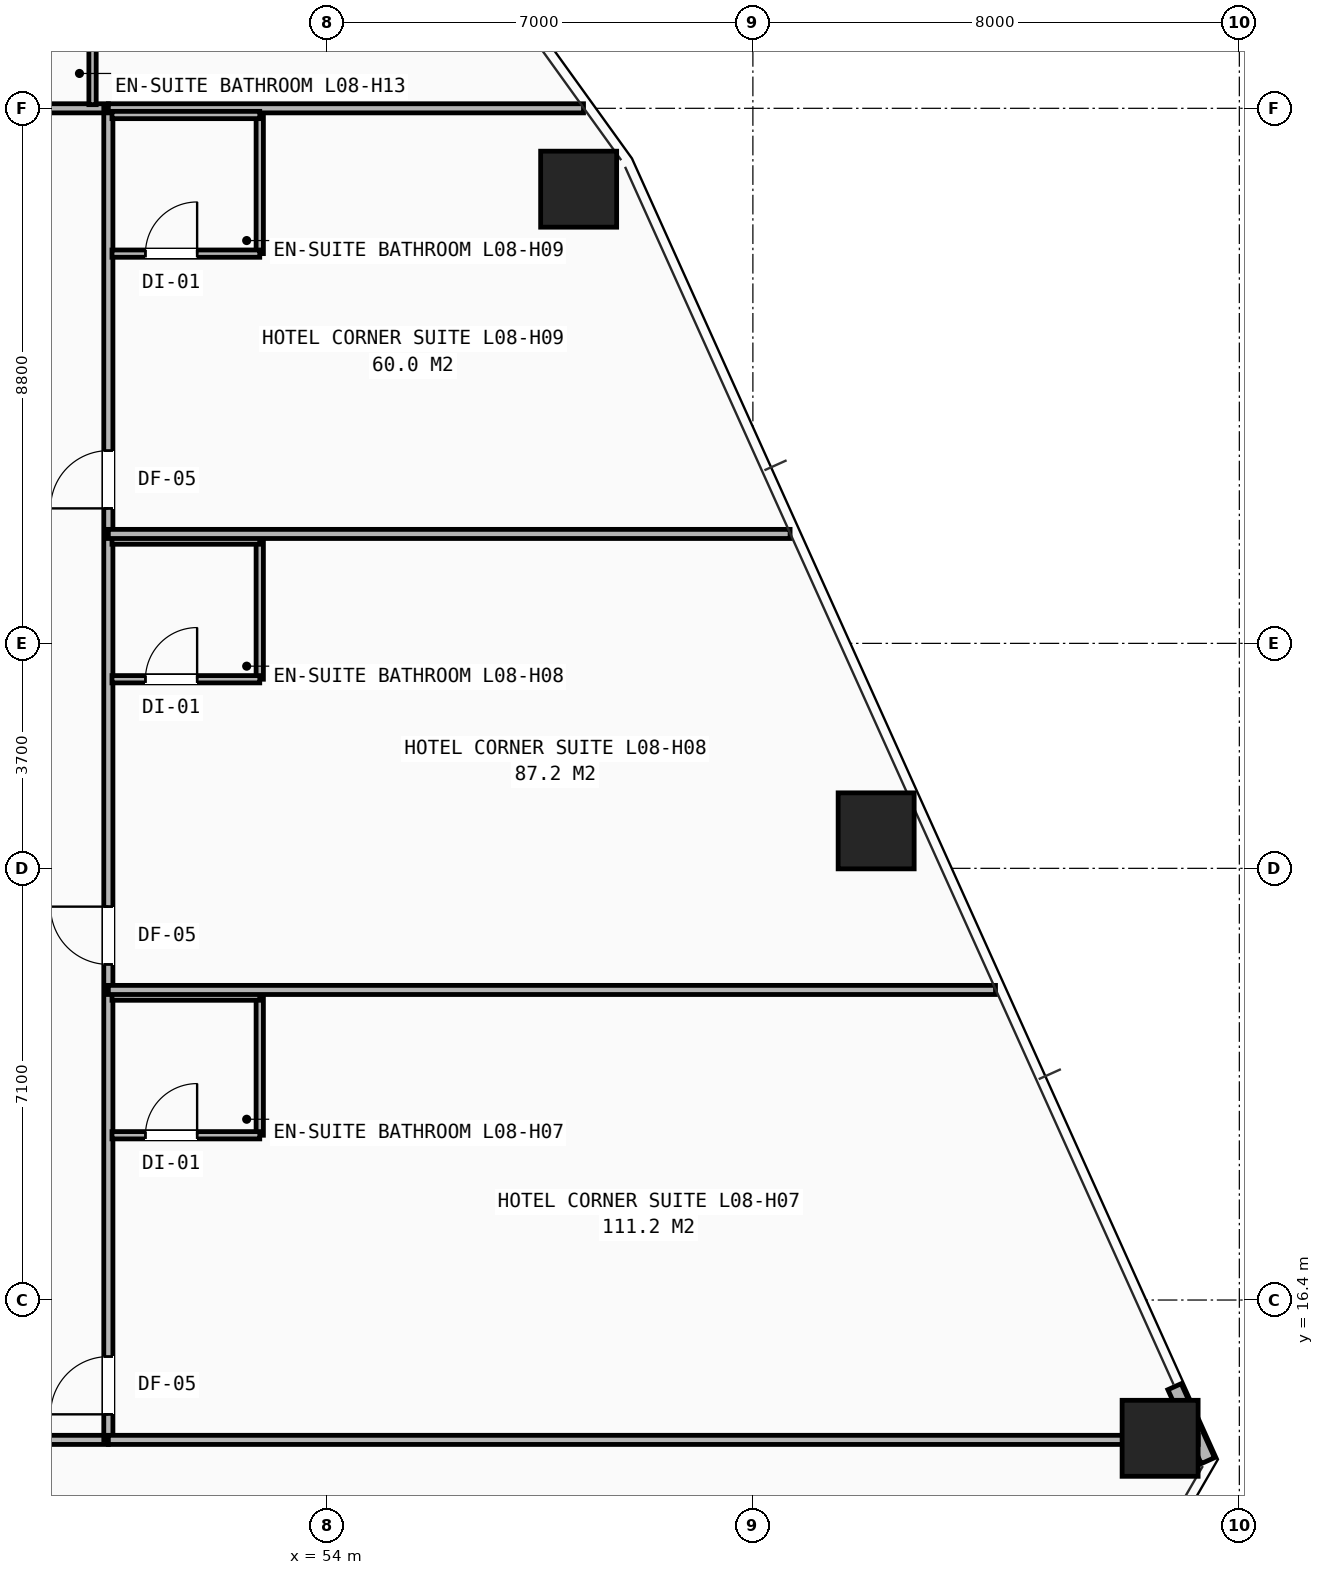
"""IFC4 building model, lengths in metres.
Left out: names, types, materials, properties, quantities, classifications, styles, units other than length and angle.
Written with IfcOpenShell. Run it as: python <this file> out.ifc"""

import sys

from ifc_helpers import new_model, si_unit, direction, frame, frame_2d, origin, origin_2d, place, context, subcontext, project, spatial, rectangle, hollow_rectangle, extrude, element, fill, save


model = new_model("IFC4")
c1 = context("Model", 3, precision=1e-05, world=origin(), true_north=direction((0.0, 1.0)))
c2 = subcontext(c1, "Body", "Model", "MODEL_VIEW")
j1 = project(units=[si_unit("LENGTHUNIT", "METRE"), si_unit("PLANEANGLEUNIT", "RADIAN")], contexts=[c1])
p1 = place(None, origin())
s1 = spatial("IfcSite", under=j1, at=p1, CompositionType="ELEMENT")
p2 = place(p1, origin())
s2 = spatial("IfcBuilding", under=s1, at=p2, CompositionType="ELEMENT")
p3 = place(p2, frame((0.0, 0.0, 33.6)))
s3 = spatial("IfcBuildingStorey", under=s2, at=p3, CompositionType="ELEMENT", Elevation=33.6)
for number, where, z_axis, x_axis in (
    (1, (67.697, 14.126, 0.0), (0.0, 0.0, 1.0), (1.0, 0.0, 0.0)),
    (2, (63.027, 24.116, 0.0), (0.0, 0.0, 1.0), (1.0, 0.0, 0.0)),
    (3, (58.135, 34.67, 0.0), (0.0, 0.0, 1.0), (1.0, 0.0, 0.0)),
):
    element("IfcColumn", number, at=place(p3, frame(where, z_axis=z_axis, x_axis=x_axis)), inside=s3, PredefinedType="COLUMN", context=c2, shape_type="SweptSolid", body=[
        extrude(hollow_rectangle(XDim=1.25, YDim=1.25, WallThickness=0.08, at=origin_2d()), origin(), (0.0, 0.0, 1.0), 3.2),
    ])
p4 = place(p3, frame((68.483, 13.758, 0.0), z_axis=(0.0, 0.0, 1.0), x_axis=(-0.410767856127, 0.91173996752, 0.0)))
e4 = element("IfcWall", 4, at=p4, inside=s3, PredefinedType="SHEAR", context=c2, shape_type="SweptSolid", body=[
    extrude(rectangle(XDim=1.334, YDim=0.24, at=frame_2d((0.667, 0.0))), origin(), (0.0, 0.0, 1.0), 2.263),
])
p5 = place(p3, frame((29.6, 14.1, 0.0), z_axis=(0.0, 0.0, 1.0), x_axis=(1.0, 0.0, 0.0)))
e5 = element("IfcWall", 5, at=p5, inside=s3, PredefinedType="PARTITIONING", context=c2, shape_type="SweptSolid", body=[
    extrude(rectangle(XDim=20.8, YDim=0.15, at=frame_2d((10.4, 0.0))), origin(), (0.0, 0.0, 1.0), 2.191),
])
p6 = place(p5, frame((0.57, 0.0, 0.0)))
e6 = element("IfcOpeningElement", 6, at=p6, cuts=e5, PredefinedType="OPENING", context=c2, shape_type="SweptSolid", body=[
    extrude(rectangle(XDim=0.95, YDim=2.1, at=frame_2d((0.475, 1.05))), frame((0.0, 0.085, 0.0), z_axis=(0.0, -1.0, 0.0), x_axis=(1.0, 0.0, 0.0)), (0.0, 0.0, 1.0), 0.17),
])
p7 = place(p5, frame((5.32, 0.0, 0.0)))
e7 = element("IfcOpeningElement", 7, at=p7, cuts=e5, PredefinedType="OPENING", context=c2, shape_type="SweptSolid", body=[
    extrude(rectangle(XDim=0.95, YDim=2.1, at=frame_2d((0.475, 1.05))), frame((0.0, 0.085, 0.0), z_axis=(0.0, -1.0, 0.0), x_axis=(1.0, 0.0, 0.0)), (0.0, 0.0, 1.0), 0.17),
])
p8 = place(p5, frame((13.32, 0.0, 0.0)))
e8 = element("IfcOpeningElement", 8, at=p8, cuts=e5, PredefinedType="OPENING", context=c2, shape_type="SweptSolid", body=[
    extrude(rectangle(XDim=0.95, YDim=2.1, at=frame_2d((0.475, 1.05))), frame((0.0, 0.085, 0.0), z_axis=(0.0, -1.0, 0.0), x_axis=(1.0, 0.0, 0.0)), (0.0, 0.0, 1.0), 0.17),
])
p9 = place(p3, frame((41.475, 36.0, 0.0), z_axis=(0.0, 0.0, 1.0), x_axis=(1.0, 0.0, 0.0)))
e9 = element("IfcWall", 9, at=p9, inside=s3, PredefinedType="PARTITIONING", context=c2, shape_type="SweptSolid", body=[
    extrude(rectangle(XDim=8.925, YDim=0.15, at=frame_2d((4.462, 0.0))), origin(), (0.0, 0.0, 1.0), 2.513),
])
p10 = place(p9, frame((0.2, 0.0, 0.0)))
e10 = element("IfcOpeningElement", 10, at=p10, cuts=e9, PredefinedType="OPENING", context=c2, shape_type="SweptSolid", body=[
    extrude(rectangle(XDim=0.95, YDim=2.1, at=frame_2d((0.475, 1.05))), frame((0.0, 0.085, 0.0), z_axis=(0.0, -1.0, 0.0), x_axis=(1.0, 0.0, 0.0)), (0.0, 0.0, 1.0), 0.17),
])
p11 = place(p9, frame((4.445, 0.0, 0.0)))
e11 = element("IfcOpeningElement", 11, at=p11, cuts=e9, PredefinedType="OPENING", context=c2, shape_type="SweptSolid", body=[
    extrude(rectangle(XDim=0.95, YDim=2.1, at=frame_2d((0.475, 1.05))), frame((0.0, 0.085, 0.0), z_axis=(0.0, -1.0, 0.0), x_axis=(1.0, 0.0, 0.0)), (0.0, 0.0, 1.0), 0.17),
])
p12 = place(p3, frame((50.4, 14.1, 0.0), z_axis=(0.0, 0.0, 1.0), x_axis=(0.0, 1.0, 0.0)))
e12 = element("IfcWall", 12, at=p12, inside=s3, PredefinedType="PARTITIONING", context=c2, shape_type="SweptSolid", body=[
    extrude(rectangle(XDim=21.9, YDim=0.15, at=frame_2d((10.95, 0.0))), origin(), (0.0, 0.0, 1.0), 2.191),
])
p13 = place(p12, frame((0.42, 0.0, 0.0)))
e13 = element("IfcOpeningElement", 13, at=p13, cuts=e12, PredefinedType="OPENING", context=c2, shape_type="SweptSolid", body=[
    extrude(rectangle(XDim=0.95, YDim=2.1, at=frame_2d((0.475, 1.05))), frame((0.0, 0.085, 0.0), z_axis=(0.0, -1.0, 0.0), x_axis=(1.0, 0.0, 0.0)), (0.0, 0.0, 1.0), 0.17),
])
p14 = place(p12, frame((7.82, 0.0, 0.0)))
e14 = element("IfcOpeningElement", 14, at=p14, cuts=e12, PredefinedType="OPENING", context=c2, shape_type="SweptSolid", body=[
    extrude(rectangle(XDim=0.95, YDim=2.1, at=frame_2d((0.475, 1.05))), frame((0.0, 0.085, 0.0), z_axis=(0.0, -1.0, 0.0), x_axis=(1.0, 0.0, 0.0)), (0.0, 0.0, 1.0), 0.17),
])
p15 = place(p12, frame((15.32, 0.0, 0.0)))
e15 = element("IfcOpeningElement", 15, at=p15, cuts=e12, PredefinedType="OPENING", context=c2, shape_type="SweptSolid", body=[
    extrude(rectangle(XDim=0.95, YDim=2.1, at=frame_2d((0.475, 1.05))), frame((0.0, 0.085, 0.0), z_axis=(0.0, -1.0, 0.0), x_axis=(1.0, 0.0, 0.0)), (0.0, 0.0, 1.0), 0.17),
])
p16 = place(p3, frame((50.4, 14.1, 0.0), z_axis=(0.0, 0.0, 1.0), x_axis=(1.0, 0.0, 0.0)))
e16 = element("IfcWall", 16, at=p16, inside=s3, PredefinedType="PARTITIONING", context=c2, shape_type="SweptSolid", body=[
    extrude(rectangle(XDim=17.923, YDim=0.15, at=frame_2d((8.961, 0.0))), origin(), (0.0, 0.0, 1.0), 2.191),
])
p17 = place(p3, frame((50.4, 36.0, 0.0), z_axis=(0.0, 0.0, 1.0), x_axis=(1.0, 0.0, 0.0)))
e17 = element("IfcWall", 17, at=p17, inside=s3, PredefinedType="PARTITIONING", context=c2, shape_type="SweptSolid", body=[
    extrude(rectangle(XDim=7.814, YDim=0.15, at=frame_2d((3.907, 0.0))), origin(), (0.0, 0.0, 1.0), 2.268),
])
p18 = place(p3, frame((52.89, 19.11, 0.0), z_axis=(0.0, 0.0, 1.0), x_axis=(0.0, 1.0, 0.0)))
e18 = element("IfcWall", 18, at=p18, inside=s3, PredefinedType="PARTITIONING", context=c2, shape_type="SweptSolid", body=[
    extrude(rectangle(XDim=2.28, YDim=0.12, at=frame_2d((1.14, 0.0))), origin(), (0.0, 0.0, 1.0), 2.98),
])
p19 = place(p3, frame((50.46, 19.11, 0.0), z_axis=(0.0, 0.0, 1.0), x_axis=(1.0, 0.0, 0.0)))
e19 = element("IfcWall", 19, at=p19, inside=s3, PredefinedType="PARTITIONING", context=c2, shape_type="SweptSolid", body=[
    extrude(rectangle(XDim=2.43, YDim=0.12, at=frame_2d((1.215, 0.0))), origin(), (0.0, 0.0, 1.0), 2.98),
])
p20 = place(p19, frame((0.55, 0.0, 0.0)))
e20 = element("IfcOpeningElement", 20, at=p20, cuts=e19, PredefinedType="OPENING", context=c2, shape_type="SweptSolid", body=[
    extrude(rectangle(XDim=0.85, YDim=2.05, at=frame_2d((0.425, 1.025))), frame((0.0, 0.07, 0.0), z_axis=(0.0, -1.0, 0.0), x_axis=(1.0, 0.0, 0.0)), (0.0, 0.0, 1.0), 0.14),
])
p21 = place(p3, frame((50.46, 21.39, 0.0), z_axis=(0.0, 0.0, 1.0), x_axis=(1.0, 0.0, 0.0)))
e21 = element("IfcWall", 21, at=p21, inside=s3, PredefinedType="PARTITIONING", context=c2, shape_type="SweptSolid", body=[
    extrude(rectangle(XDim=2.43, YDim=0.12, at=frame_2d((1.215, 0.0))), origin(), (0.0, 0.0, 1.0), 2.98),
])
p22 = place(p3, frame((50.4, 21.5, 0.0), z_axis=(0.0, 0.0, 1.0), x_axis=(1.0, 0.0, 0.0)))
e22 = element("IfcWall", 22, at=p22, inside=s3, PredefinedType="PARTITIONING", context=c2, shape_type="SweptSolid", body=[
    extrude(rectangle(XDim=14.59, YDim=0.15, at=frame_2d((7.295, 0.0))), origin(), (0.0, 0.0, 1.0), 2.268),
])
p23 = place(p3, frame((52.89, 26.61, 0.0), z_axis=(0.0, 0.0, 1.0), x_axis=(0.0, 1.0, 0.0)))
e23 = element("IfcWall", 23, at=p23, inside=s3, PredefinedType="PARTITIONING", context=c2, shape_type="SweptSolid", body=[
    extrude(rectangle(XDim=2.28, YDim=0.12, at=frame_2d((1.14, 0.0))), origin(), (0.0, 0.0, 1.0), 2.98),
])
p24 = place(p3, frame((50.46, 26.61, 0.0), z_axis=(0.0, 0.0, 1.0), x_axis=(1.0, 0.0, 0.0)))
e24 = element("IfcWall", 24, at=p24, inside=s3, PredefinedType="PARTITIONING", context=c2, shape_type="SweptSolid", body=[
    extrude(rectangle(XDim=2.43, YDim=0.12, at=frame_2d((1.215, 0.0))), origin(), (0.0, 0.0, 1.0), 2.98),
])
p25 = place(p24, frame((0.55, 0.0, 0.0)))
e25 = element("IfcOpeningElement", 25, at=p25, cuts=e24, PredefinedType="OPENING", context=c2, shape_type="SweptSolid", body=[
    extrude(rectangle(XDim=0.85, YDim=2.05, at=frame_2d((0.425, 1.025))), frame((0.0, 0.07, 0.0), z_axis=(0.0, -1.0, 0.0), x_axis=(1.0, 0.0, 0.0)), (0.0, 0.0, 1.0), 0.14),
])
p26 = place(p3, frame((50.46, 28.89, 0.0), z_axis=(0.0, 0.0, 1.0), x_axis=(1.0, 0.0, 0.0)))
e26 = element("IfcWall", 26, at=p26, inside=s3, PredefinedType="PARTITIONING", context=c2, shape_type="SweptSolid", body=[
    extrude(rectangle(XDim=2.43, YDim=0.12, at=frame_2d((1.215, 0.0))), origin(), (0.0, 0.0, 1.0), 2.98),
])
p27 = place(p3, frame((50.4, 29.0, 0.0), z_axis=(0.0, 0.0, 1.0), x_axis=(1.0, 0.0, 0.0)))
e27 = element("IfcWall", 27, at=p27, inside=s3, PredefinedType="PARTITIONING", context=c2, shape_type="SweptSolid", body=[
    extrude(rectangle(XDim=11.212, YDim=0.15, at=frame_2d((5.606, 0.0))), origin(), (0.0, 0.0, 1.0), 2.268),
])
p28 = place(p3, frame((52.89, 33.61, 0.0), z_axis=(0.0, 0.0, 1.0), x_axis=(0.0, 1.0, 0.0)))
e28 = element("IfcWall", 28, at=p28, inside=s3, PredefinedType="PARTITIONING", context=c2, shape_type="SweptSolid", body=[
    extrude(rectangle(XDim=2.28, YDim=0.12, at=frame_2d((1.14, 0.0))), origin(), (0.0, 0.0, 1.0), 2.98),
])
p29 = place(p3, frame((50.46, 33.61, 0.0), z_axis=(0.0, 0.0, 1.0), x_axis=(1.0, 0.0, 0.0)))
e29 = element("IfcWall", 29, at=p29, inside=s3, PredefinedType="PARTITIONING", context=c2, shape_type="SweptSolid", body=[
    extrude(rectangle(XDim=2.43, YDim=0.12, at=frame_2d((1.215, 0.0))), origin(), (0.0, 0.0, 1.0), 2.513),
])
p30 = place(p29, frame((0.55, 0.0, 0.0)))
e30 = element("IfcOpeningElement", 30, at=p30, cuts=e29, PredefinedType="OPENING", context=c2, shape_type="SweptSolid", body=[
    extrude(rectangle(XDim=0.85, YDim=2.05, at=frame_2d((0.425, 1.025))), frame((0.0, 0.07, 0.0), z_axis=(0.0, -1.0, 0.0), x_axis=(1.0, 0.0, 0.0)), (0.0, 0.0, 1.0), 0.14),
])
for number, where, z_axis, x_axis in (
    (31, (50.46, 35.89, 0.0), (0.0, 0.0, 1.0), (1.0, 0.0, 0.0)),
    (32, (50.14, 36.06, 0.0), (0.0, 0.0, 1.0), (0.0, 1.0, 0.0)),
):
    element("IfcWall", number, at=place(p3, frame(where, z_axis=z_axis, x_axis=x_axis)), inside=s3, PredefinedType="PARTITIONING", context=c2, shape_type="SweptSolid", body=[
        extrude(rectangle(XDim=2.43, YDim=0.12, at=frame_2d((1.215, 0.0))), origin(), (0.0, 0.0, 1.0), 2.513),
    ])
p31 = place(p13, origin())
e33 = element("IfcDoor", 33, at=p31, inside=s3, OperationType="SINGLE_SWING_LEFT", PredefinedType="DOOR", context=c2, shape_type="SweptSolid", body=[
    extrude(rectangle(XDim=0.95, YDim=2.1, at=frame_2d((0.475, 1.05))), frame((0.0, 0.025, 0.0), z_axis=(0.0, -1.0, 0.0), x_axis=(1.0, 0.0, 0.0)), (0.0, 0.0, 1.0), 0.05),
])
fill(e13, e33)
p32 = place(p20, origin())
e34 = element("IfcDoor", 34, at=p32, inside=s3, OperationType="SINGLE_SWING_RIGHT", PredefinedType="DOOR", context=c2, shape_type="SweptSolid", body=[
    extrude(rectangle(XDim=0.85, YDim=2.05, at=frame_2d((0.425, 1.025))), frame((0.0, 0.025, 0.0), z_axis=(0.0, -1.0, 0.0), x_axis=(1.0, 0.0, 0.0)), (0.0, 0.0, 1.0), 0.05),
])
fill(e20, e34)
p33 = place(p14, origin())
e35 = element("IfcDoor", 35, at=p33, inside=s3, OperationType="SINGLE_SWING_RIGHT", PredefinedType="DOOR", context=c2, shape_type="SweptSolid", body=[
    extrude(rectangle(XDim=0.95, YDim=2.1, at=frame_2d((0.475, 1.05))), frame((0.0, 0.025, 0.0), z_axis=(0.0, -1.0, 0.0), x_axis=(1.0, 0.0, 0.0)), (0.0, 0.0, 1.0), 0.05),
])
fill(e14, e35)
p34 = place(p25, origin())
e36 = element("IfcDoor", 36, at=p34, inside=s3, OperationType="SINGLE_SWING_RIGHT", PredefinedType="DOOR", context=c2, shape_type="SweptSolid", body=[
    extrude(rectangle(XDim=0.85, YDim=2.05, at=frame_2d((0.425, 1.025))), frame((0.0, 0.025, 0.0), z_axis=(0.0, -1.0, 0.0), x_axis=(1.0, 0.0, 0.0)), (0.0, 0.0, 1.0), 0.05),
])
fill(e25, e36)
p35 = place(p15, origin())
e37 = element("IfcDoor", 37, at=p35, inside=s3, OperationType="SINGLE_SWING_LEFT", PredefinedType="DOOR", context=c2, shape_type="SweptSolid", body=[
    extrude(rectangle(XDim=0.95, YDim=2.1, at=frame_2d((0.475, 1.05))), frame((0.0, 0.025, 0.0), z_axis=(0.0, -1.0, 0.0), x_axis=(1.0, 0.0, 0.0)), (0.0, 0.0, 1.0), 0.05),
])
fill(e15, e37)
p36 = place(p30, origin())
e38 = element("IfcDoor", 38, at=p36, inside=s3, OperationType="SINGLE_SWING_RIGHT", PredefinedType="DOOR", context=c2, shape_type="SweptSolid", body=[
    extrude(rectangle(XDim=0.85, YDim=2.05, at=frame_2d((0.425, 1.025))), frame((0.0, 0.025, 0.0), z_axis=(0.0, -1.0, 0.0), x_axis=(1.0, 0.0, 0.0)), (0.0, 0.0, 1.0), 0.05),
])
fill(e30, e38)
save(model, sys.argv[1])
